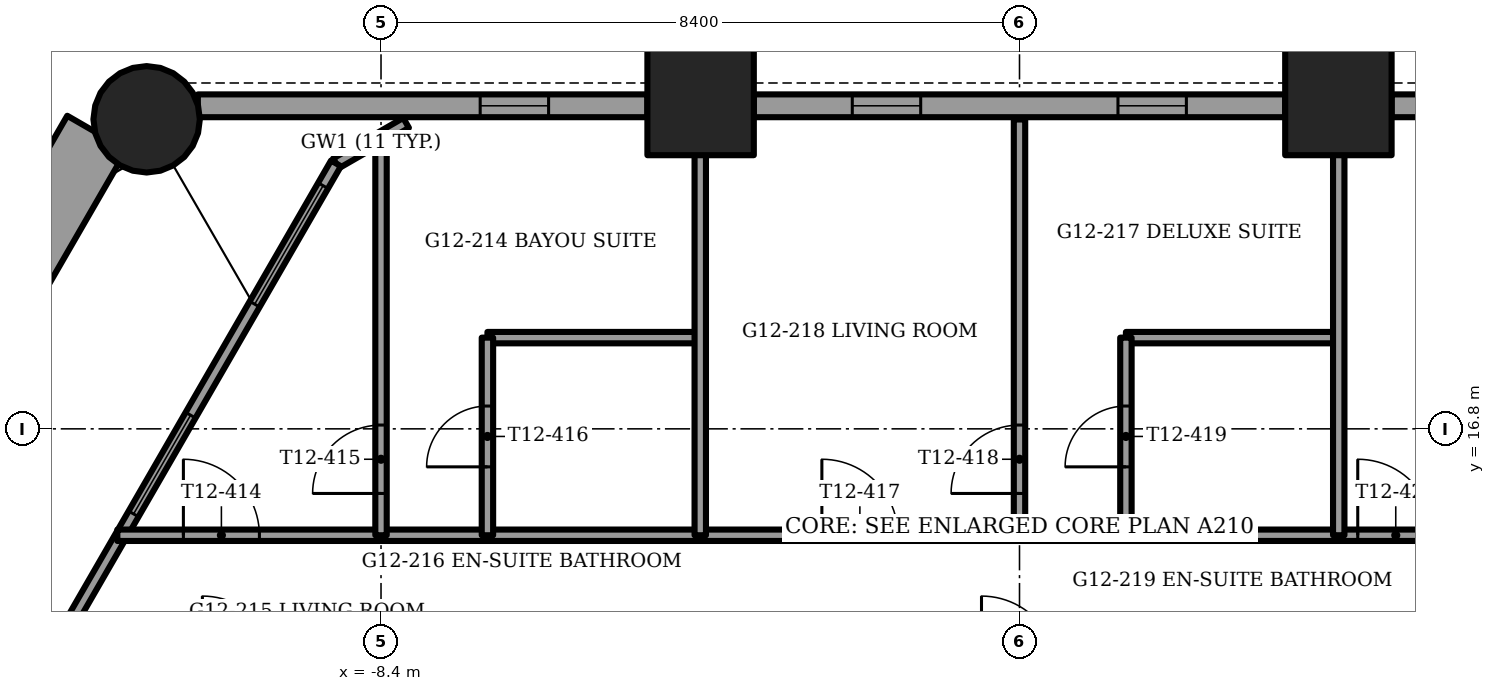
"""IFC4 building model, lengths in metres.
Left out: names, types, materials, properties, quantities, classifications, styles, units other than length and angle.
Written with IfcOpenShell. Run it as: python <this file> out.ifc"""

import sys

from ifc_helpers import new_model, si_unit, direction, frame, frame_2d, origin, origin_2d, place, context, subcontext, project, spatial, rectangle, circle, extrude, element, fill, save


model = new_model("IFC4")
c1 = context("Model", 3, precision=1e-05, world=origin(), true_north=direction((0.0, 1.0)))
c2 = subcontext(c1, "Body", "Model", "MODEL_VIEW")
j1 = project(units=[si_unit("LENGTHUNIT", "METRE"), si_unit("PLANEANGLEUNIT", "RADIAN")], contexts=[c1])
p1 = place(None, origin())
s1 = spatial("IfcSite", under=j1, at=p1, CompositionType="ELEMENT")
p2 = place(p1, origin())
s2 = spatial("IfcBuilding", under=s1, at=p2, CompositionType="ELEMENT")
p3 = place(p2, frame((0.0, 0.0, 50.5)))
s3 = spatial("IfcBuildingStorey", under=s2, at=p3, CompositionType="ELEMENT", Elevation=50.5)
p4 = place(p3, frame((-11.484, 20.872, -1.2), z_axis=(0.0, 0.0, 1.0), x_axis=(1.0, 0.0, 0.0)))
e1 = element("IfcColumn", 1, at=p4, inside=s3, PredefinedType="COLUMN", context=c2, shape_type="SweptSolid", body=[
    extrude(circle(Radius=0.7, at=origin_2d()), origin(), (0.0, 0.0, 1.0), 3.75),
])
for number, where, z_axis, x_axis in (
    (2, (4.195, 21.1, -1.2), (0.0, 0.0, 1.0), (1.0, 0.0, 0.0)),
    (3, (-4.195, 21.1, -1.2), (0.0, 0.0, 1.0), (1.0, 0.0, 0.0)),
):
    element("IfcColumn", number, at=place(p3, frame(where, z_axis=z_axis, x_axis=x_axis)), inside=s3, PredefinedType="COLUMN", context=c2, shape_type="SweptSolid", body=[
        extrude(rectangle(XDim=1.4, YDim=1.4, at=origin_2d()), origin(), (0.0, 0.0, 1.0), 3.75),
    ])
p5 = place(p3, frame((-12.138, 20.694, 0.0), z_axis=(0.0, 0.0, 1.0), x_axis=(-0.500009789943, -0.866019751484, 0.0)))
e4 = element("IfcWall", 4, at=p5, inside=s3, PredefinedType="PARAPET", context=c2, shape_type="SweptSolid", body=[
    extrude(rectangle(XDim=6.987, YDim=0.9, at=frame_2d((3.494, 0.0))), origin(), (0.0, 0.0, 1.0), 1.1),
])
p6 = place(p3, frame((10.81, 21.05, 0.0), z_axis=(0.0, 0.0, 1.0), x_axis=(-1.0, 0.0, 0.0)))
e5 = element("IfcWall", 5, at=p6, inside=s3, PredefinedType="SOLIDWALL", context=c2, shape_type="SweptSolid", body=[
    extrude(rectangle(XDim=5.914, YDim=0.3, at=frame_2d((2.957, 0.0))), origin(), (0.0, 0.0, 1.0), 2.55),
])
p7 = place(p6, frame((3.522, 0.0, 0.15)))
e6 = element("IfcOpeningElement", 6, at=p7, cuts=e5, PredefinedType="OPENING", context=c2, shape_type="SweptSolid", body=[
    extrude(rectangle(XDim=0.9, YDim=2.15, at=frame_2d((0.45, 1.075))), frame((0.0, 0.15, 0.0), z_axis=(0.0, -1.0, 0.0), x_axis=(1.0, 0.0, 0.0)), (0.0, 0.0, 1.0), 0.3),
])
p8 = place(p3, frame((3.495, 21.05, 0.0), z_axis=(0.0, 0.0, 1.0), x_axis=(-1.0, 0.0, 0.0)))
e7 = element("IfcWall", 7, at=p8, inside=s3, PredefinedType="SOLIDWALL", context=c2, shape_type="SweptSolid", body=[
    extrude(rectangle(XDim=6.991, YDim=0.3, at=frame_2d((3.495, 0.0))), origin(), (0.0, 0.0, 1.0), 2.55),
])
p9 = place(p8, frame((1.3, 0.0, 0.15)))
e8 = element("IfcOpeningElement", 8, at=p9, cuts=e7, PredefinedType="OPENING", context=c2, shape_type="SweptSolid", body=[
    extrude(rectangle(XDim=0.9, YDim=2.15, at=frame_2d((0.45, 1.075))), frame((0.0, 0.15, 0.0), z_axis=(0.0, -1.0, 0.0), x_axis=(1.0, 0.0, 0.0)), (0.0, 0.0, 1.0), 0.3),
])
p10 = place(p8, frame((4.795, 0.0, 0.15)))
e9 = element("IfcOpeningElement", 9, at=p10, cuts=e7, PredefinedType="OPENING", context=c2, shape_type="SweptSolid", body=[
    extrude(rectangle(XDim=0.9, YDim=2.15, at=frame_2d((0.45, 1.075))), frame((0.0, 0.15, 0.0), z_axis=(0.0, -1.0, 0.0), x_axis=(1.0, 0.0, 0.0)), (0.0, 0.0, 1.0), 0.3),
])
p11 = place(p3, frame((-4.896, 21.05, 0.0), z_axis=(0.0, 0.0, 1.0), x_axis=(-1.0, 0.0, 0.0)))
e10 = element("IfcWall", 10, at=p11, inside=s3, PredefinedType="SOLIDWALL", context=c2, shape_type="SweptSolid", body=[
    extrude(rectangle(XDim=5.914, YDim=0.3, at=frame_2d((2.957, 0.0))), origin(), (0.0, 0.0, 1.0), 2.55),
])
p12 = place(p11, frame((1.3, 0.0, 0.15)))
e11 = element("IfcOpeningElement", 11, at=p12, cuts=e10, PredefinedType="OPENING", context=c2, shape_type="SweptSolid", body=[
    extrude(rectangle(XDim=0.9, YDim=2.15, at=frame_2d((0.45, 1.075))), frame((0.0, 0.15, 0.0), z_axis=(0.0, -1.0, 0.0), x_axis=(1.0, 0.0, 0.0)), (0.0, 0.0, 1.0), 0.3),
])
p13 = place(p3, frame((-8.993, 20.292, 0.0), z_axis=(0.0, 0.0, 1.0), x_axis=(-0.49999960747, -0.866025630412, 0.0)))
e12 = element("IfcWall", 12, at=p13, inside=s3, PredefinedType="SOLIDWALL", context=c2, shape_type="SweptSolid", body=[
    extrude(rectangle(XDim=23.384, YDim=0.15, at=frame_2d((11.692, 0.0))), origin(), (0.0, 0.0, 1.0), 3.45),
])
p14 = place(p13, frame((3.825, 0.0, 0.15)))
e13 = element("IfcOpeningElement", 13, at=p14, cuts=e12, PredefinedType="OPENING", context=c2, shape_type="SweptSolid", body=[
    extrude(rectangle(XDim=1.5, YDim=2.85, at=frame_2d((0.75, 1.425))), frame((0.0, 0.075, 0.0), z_axis=(0.0, -1.0, 0.0), x_axis=(1.0, 0.0, 0.0)), (0.0, 0.0, 1.0), 0.15),
])
p15 = place(p13, frame((7.687, 0.0, 0.15)))
e14 = element("IfcOpeningElement", 14, at=p15, cuts=e12, PredefinedType="OPENING", context=c2, shape_type="SweptSolid", body=[
    extrude(rectangle(XDim=1.5, YDim=2.85, at=frame_2d((0.75, 1.425))), frame((0.0, 0.075, 0.0), z_axis=(0.0, -1.0, 0.0), x_axis=(1.0, 0.0, 0.0)), (0.0, 0.0, 1.0), 0.15),
])
p16 = place(p13, frame((11.278, 0.0, 0.15)))
e15 = element("IfcOpeningElement", 15, at=p16, cuts=e12, PredefinedType="OPENING", context=c2, shape_type="SweptSolid", body=[
    extrude(rectangle(XDim=1.8, YDim=2.85, at=frame_2d((0.9, 1.425))), frame((0.0, 0.075, 0.0), z_axis=(0.0, -1.0, 0.0), x_axis=(1.0, 0.0, 0.0)), (0.0, 0.0, 1.0), 0.15),
])
p17 = place(p13, frame((13.377, 0.0, 0.15)))
e16 = element("IfcOpeningElement", 16, at=p17, cuts=e12, PredefinedType="OPENING", context=c2, shape_type="SweptSolid", body=[
    extrude(rectangle(XDim=1.5, YDim=2.85, at=frame_2d((0.75, 1.425))), frame((0.0, 0.075, 0.0), z_axis=(0.0, -1.0, 0.0), x_axis=(1.0, 0.0, 0.0)), (0.0, 0.0, 1.0), 0.15),
])
p18 = place(p13, frame((15.478, 0.0, 0.15)))
e17 = element("IfcOpeningElement", 17, at=p18, cuts=e12, PredefinedType="OPENING", context=c2, shape_type="SweptSolid", body=[
    extrude(rectangle(XDim=1.8, YDim=2.85, at=frame_2d((0.9, 1.425))), frame((0.0, 0.075, 0.0), z_axis=(0.0, -1.0, 0.0), x_axis=(1.0, 0.0, 0.0)), (0.0, 0.0, 1.0), 0.15),
])
p19 = place(p13, frame((17.577, 0.0, 0.15)))
e18 = element("IfcOpeningElement", 18, at=p19, cuts=e12, PredefinedType="OPENING", context=c2, shape_type="SweptSolid", body=[
    extrude(rectangle(XDim=1.5, YDim=2.85, at=frame_2d((0.75, 1.425))), frame((0.0, 0.075, 0.0), z_axis=(0.0, -1.0, 0.0), x_axis=(1.0, 0.0, 0.0)), (0.0, 0.0, 1.0), 0.15),
])
p20 = place(p13, frame((0.339, 0.0, 0.15)))
e19 = element("IfcOpeningElement", 19, at=p20, cuts=e12, PredefinedType="OPENING", context=c2, shape_type="SweptSolid", body=[
    extrude(rectangle(XDim=1.8, YDim=2.73, at=frame_2d((0.9, 1.365))), frame((0.0, 0.075, 0.0), z_axis=(0.0, -1.0, 0.0), x_axis=(1.0, 0.0, 0.0)), (0.0, 0.0, 1.0), 0.15),
])
p21 = place(p13, frame((21.12, 0.0, 0.15)))
e20 = element("IfcOpeningElement", 20, at=p21, cuts=e12, PredefinedType="OPENING", context=c2, shape_type="SweptSolid", body=[
    extrude(rectangle(XDim=1.8, YDim=2.73, at=frame_2d((0.9, 1.365))), frame((0.0, 0.075, 0.0), z_axis=(0.0, -1.0, 0.0), x_axis=(1.0, 0.0, 0.0)), (0.0, 0.0, 1.0), 0.15),
])
p22 = place(p3, frame((-8.07, 20.825, 0.0), z_axis=(0.0, 0.0, 1.0), x_axis=(-0.866048165231, -0.499960573946, 0.0)))
e21 = element("IfcWall", 21, at=p22, inside=s3, PredefinedType="SOLIDWALL", context=c2, shape_type="SweptSolid", body=[
    extrude(rectangle(XDim=1.065, YDim=0.15, at=frame_2d((0.532, 0.0))), origin(), (0.0, 0.0, 1.0), 3.45),
])
p23 = place(p3, frame((-11.869, 15.4, 0.0), z_axis=(0.0, 0.0, 1.0), x_axis=(1.0, 0.0, 0.0)))
e22 = element("IfcWall", 22, at=p23, inside=s3, PredefinedType="PARTITIONING", context=c2, shape_type="SweptSolid", body=[
    extrude(rectangle(XDim=23.738, YDim=0.15, at=frame_2d((11.869, 0.0))), origin(), (0.0, 0.0, 1.0), 3.45),
])
p24 = place(p23, frame((0.869, 0.0, 0.0)))
e23 = element("IfcOpeningElement", 23, at=p24, cuts=e22, PredefinedType="OPENING", context=c2, shape_type="SweptSolid", body=[
    extrude(rectangle(XDim=1.0, YDim=2.1, at=frame_2d((0.5, 1.05))), frame((0.0, 0.075, 0.0), z_axis=(0.0, -1.0, 0.0), x_axis=(1.0, 0.0, 0.0)), (0.0, 0.0, 1.0), 0.15),
])
p25 = place(p23, frame((9.269, 0.0, 0.0)))
e24 = element("IfcOpeningElement", 24, at=p25, cuts=e22, PredefinedType="OPENING", context=c2, shape_type="SweptSolid", body=[
    extrude(rectangle(XDim=1.0, YDim=2.1, at=frame_2d((0.5, 1.05))), frame((0.0, 0.075, 0.0), z_axis=(0.0, -1.0, 0.0), x_axis=(1.0, 0.0, 0.0)), (0.0, 0.0, 1.0), 0.15),
])
p26 = place(p23, frame((16.319, 0.0, 0.0)))
e25 = element("IfcOpeningElement", 25, at=p26, cuts=e22, PredefinedType="OPENING", context=c2, shape_type="SweptSolid", body=[
    extrude(rectangle(XDim=1.0, YDim=2.1, at=frame_2d((0.5, 1.05))), frame((0.0, 0.075, 0.0), z_axis=(0.0, -1.0, 0.0), x_axis=(1.0, 0.0, 0.0)), (0.0, 0.0, 1.0), 0.15),
])
for number, where, z_axis, x_axis in (
    (26, (-7.0, 18.0, 0.0), (0.0, 0.0, 1.0), (1.0, 0.0, 0.0)),
    (27, (1.4, 18.0, 0.0), (0.0, 0.0, 1.0), (1.0, 0.0, 0.0)),
):
    element("IfcWall", number, at=place(p3, frame(where, z_axis=z_axis, x_axis=x_axis)), inside=s3, PredefinedType="PARTITIONING", context=c2, shape_type="SweptSolid", body=[
        extrude(rectangle(XDim=2.8, YDim=0.15, at=frame_2d((1.4, 0.0))), origin(), (0.0, 0.0, 1.0), 3.45),
    ])
p27 = place(p3, frame((4.2, 15.4, 0.0), z_axis=(0.0, 0.0, 1.0), x_axis=(0.0, 1.0, 0.0)))
e28 = element("IfcWall", 28, at=p27, inside=s3, PredefinedType="PARTITIONING", context=c2, shape_type="SweptSolid", body=[
    extrude(rectangle(XDim=5.47, YDim=0.15, at=frame_2d((2.735, 0.0))), origin(), (0.0, 0.0, 1.0), 3.45),
])
p28 = place(p3, frame((1.4, 15.4, 0.0), z_axis=(0.0, 0.0, 1.0), x_axis=(0.0, 1.0, 0.0)))
e29 = element("IfcWall", 29, at=p28, inside=s3, PredefinedType="PARTITIONING", context=c2, shape_type="SweptSolid", body=[
    extrude(rectangle(XDim=2.6, YDim=0.15, at=frame_2d((1.3, 0.0))), origin(), (0.0, 0.0, 1.0), 3.45),
])
p29 = place(p28, frame((0.9, 0.0, 0.0)))
e30 = element("IfcOpeningElement", 30, at=p29, cuts=e29, PredefinedType="OPENING", context=c2, shape_type="SweptSolid", body=[
    extrude(rectangle(XDim=0.8, YDim=2.1, at=frame_2d((0.4, 1.05))), frame((0.0, 0.075, 0.0), z_axis=(0.0, -1.0, 0.0), x_axis=(1.0, 0.0, 0.0)), (0.0, 0.0, 1.0), 0.15),
])
p30 = place(p3, frame((0.0, 15.4, 0.0), z_axis=(0.0, 0.0, 1.0), x_axis=(0.0, 1.0, 0.0)))
e31 = element("IfcWall", 31, at=p30, inside=s3, PredefinedType="PARTITIONING", context=c2, shape_type="SweptSolid", body=[
    extrude(rectangle(XDim=5.47, YDim=0.15, at=frame_2d((2.735, 0.0))), origin(), (0.0, 0.0, 1.0), 3.45),
])
p31 = place(p30, frame((0.55, 0.0, 0.0)))
e32 = element("IfcOpeningElement", 32, at=p31, cuts=e31, PredefinedType="OPENING", context=c2, shape_type="SweptSolid", body=[
    extrude(rectangle(XDim=0.9, YDim=2.1, at=frame_2d((0.45, 1.05))), frame((0.0, 0.075, 0.0), z_axis=(0.0, -1.0, 0.0), x_axis=(1.0, 0.0, 0.0)), (0.0, 0.0, 1.0), 0.15),
])
p32 = place(p3, frame((-4.2, 15.4, 0.0), z_axis=(0.0, 0.0, 1.0), x_axis=(0.0, 1.0, 0.0)))
e33 = element("IfcWall", 33, at=p32, inside=s3, PredefinedType="PARTITIONING", context=c2, shape_type="SweptSolid", body=[
    extrude(rectangle(XDim=5.47, YDim=0.15, at=frame_2d((2.735, 0.0))), origin(), (0.0, 0.0, 1.0), 3.45),
])
p33 = place(p3, frame((-7.0, 15.4, 0.0), z_axis=(0.0, 0.0, 1.0), x_axis=(0.0, 1.0, 0.0)))
e34 = element("IfcWall", 34, at=p33, inside=s3, PredefinedType="PARTITIONING", context=c2, shape_type="SweptSolid", body=[
    extrude(rectangle(XDim=2.6, YDim=0.15, at=frame_2d((1.3, 0.0))), origin(), (0.0, 0.0, 1.0), 3.45),
])
p34 = place(p33, frame((0.9, 0.0, 0.0)))
e35 = element("IfcOpeningElement", 35, at=p34, cuts=e34, PredefinedType="OPENING", context=c2, shape_type="SweptSolid", body=[
    extrude(rectangle(XDim=0.8, YDim=2.1, at=frame_2d((0.4, 1.05))), frame((0.0, 0.075, 0.0), z_axis=(0.0, -1.0, 0.0), x_axis=(1.0, 0.0, 0.0)), (0.0, 0.0, 1.0), 0.15),
])
p35 = place(p3, frame((-8.4, 15.4, 0.0), z_axis=(0.0, 0.0, 1.0), x_axis=(0.0, 1.0, 0.0)))
e36 = element("IfcWall", 36, at=p35, inside=s3, PredefinedType="PARTITIONING", context=c2, shape_type="SweptSolid", body=[
    extrude(rectangle(XDim=5.255, YDim=0.15, at=frame_2d((2.627, 0.0))), origin(), (0.0, 0.0, 1.0), 3.45),
])
p36 = place(p35, frame((0.55, 0.0, 0.0)))
e37 = element("IfcOpeningElement", 37, at=p36, cuts=e36, PredefinedType="OPENING", context=c2, shape_type="SweptSolid", body=[
    extrude(rectangle(XDim=0.9, YDim=2.1, at=frame_2d((0.45, 1.05))), frame((0.0, 0.075, 0.0), z_axis=(0.0, -1.0, 0.0), x_axis=(1.0, 0.0, 0.0)), (0.0, 0.0, 1.0), 0.15),
])
p37 = place(p9, origin())
e38 = element("IfcWindow", 38, at=p37, inside=s3, PartitioningType="SINGLE_PANEL", PredefinedType="WINDOW", context=c2, shape_type="SweptSolid", body=[
    extrude(rectangle(XDim=0.9, YDim=2.15, at=frame_2d((0.45, 1.075))), frame((0.0, 0.03, 0.0), z_axis=(0.0, -1.0, 0.0), x_axis=(1.0, 0.0, 0.0)), (0.0, 0.0, 1.0), 0.06),
])
fill(e8, e38)
p38 = place(p10, origin())
e39 = element("IfcWindow", 39, at=p38, inside=s3, PartitioningType="SINGLE_PANEL", PredefinedType="WINDOW", context=c2, shape_type="SweptSolid", body=[
    extrude(rectangle(XDim=0.9, YDim=2.15, at=frame_2d((0.45, 1.075))), frame((0.0, 0.03, 0.0), z_axis=(0.0, -1.0, 0.0), x_axis=(1.0, 0.0, 0.0)), (0.0, 0.0, 1.0), 0.06),
])
fill(e9, e39)
p39 = place(p12, origin())
e40 = element("IfcWindow", 40, at=p39, inside=s3, PartitioningType="SINGLE_PANEL", PredefinedType="WINDOW", context=c2, shape_type="SweptSolid", body=[
    extrude(rectangle(XDim=0.9, YDim=2.15, at=frame_2d((0.45, 1.075))), frame((0.0, 0.03, 0.0), z_axis=(0.0, -1.0, 0.0), x_axis=(1.0, 0.0, 0.0)), (0.0, 0.0, 1.0), 0.06),
])
fill(e11, e40)
p40 = place(p14, origin())
e41 = element("IfcWindow", 41, at=p40, inside=s3, PartitioningType="SINGLE_PANEL", PredefinedType="WINDOW", context=c2, shape_type="SweptSolid", body=[
    extrude(rectangle(XDim=1.5, YDim=2.85, at=frame_2d((0.75, 1.425))), frame((0.0, 0.03, 0.0), z_axis=(0.0, -1.0, 0.0), x_axis=(1.0, 0.0, 0.0)), (0.0, 0.0, 1.0), 0.06),
])
fill(e13, e41)
p41 = place(p20, origin())
e42 = element("IfcWindow", 42, at=p41, inside=s3, PartitioningType="SINGLE_PANEL", PredefinedType="WINDOW", context=c2, shape_type="SweptSolid", body=[
    extrude(rectangle(XDim=1.8, YDim=2.73, at=frame_2d((0.9, 1.365))), frame((0.0, 0.03, 0.0), z_axis=(0.0, -1.0, 0.0), x_axis=(1.0, 0.0, 0.0)), (0.0, 0.0, 1.0), 0.06),
])
fill(e19, e42)
p42 = place(p24, origin())
e43 = element("IfcDoor", 43, at=p42, inside=s3, OperationType="SINGLE_SWING_LEFT", PredefinedType="DOOR", context=c2, shape_type="SweptSolid", body=[
    extrude(rectangle(XDim=1.0, YDim=2.1, at=frame_2d((0.5, 1.05))), frame((0.0, 0.025, 0.0), z_axis=(0.0, -1.0, 0.0), x_axis=(1.0, 0.0, 0.0)), (0.0, 0.0, 1.0), 0.05),
])
fill(e23, e43)
p43 = place(p36, origin())
e44 = element("IfcDoor", 44, at=p43, inside=s3, OperationType="SINGLE_SWING_LEFT", PredefinedType="DOOR", context=c2, shape_type="SweptSolid", body=[
    extrude(rectangle(XDim=0.9, YDim=2.1, at=frame_2d((0.45, 1.05))), frame((0.0, 0.025, 0.0), z_axis=(0.0, -1.0, 0.0), x_axis=(1.0, 0.0, 0.0)), (0.0, 0.0, 1.0), 0.05),
])
fill(e37, e44)
p44 = place(p34, origin())
e45 = element("IfcDoor", 45, at=p44, inside=s3, OperationType="SINGLE_SWING_LEFT", PredefinedType="DOOR", context=c2, shape_type="SweptSolid", body=[
    extrude(rectangle(XDim=0.8, YDim=2.1, at=frame_2d((0.4, 1.05))), frame((0.0, 0.025, 0.0), z_axis=(0.0, -1.0, 0.0), x_axis=(1.0, 0.0, 0.0)), (0.0, 0.0, 1.0), 0.05),
])
fill(e35, e45)
p45 = place(p25, origin())
e46 = element("IfcDoor", 46, at=p45, inside=s3, OperationType="SINGLE_SWING_LEFT", PredefinedType="DOOR", context=c2, shape_type="SweptSolid", body=[
    extrude(rectangle(XDim=1.0, YDim=2.1, at=frame_2d((0.5, 1.05))), frame((0.0, 0.025, 0.0), z_axis=(0.0, -1.0, 0.0), x_axis=(1.0, 0.0, 0.0)), (0.0, 0.0, 1.0), 0.05),
])
fill(e24, e46)
p46 = place(p31, origin())
e47 = element("IfcDoor", 47, at=p46, inside=s3, OperationType="SINGLE_SWING_LEFT", PredefinedType="DOOR", context=c2, shape_type="SweptSolid", body=[
    extrude(rectangle(XDim=0.9, YDim=2.1, at=frame_2d((0.45, 1.05))), frame((0.0, 0.025, 0.0), z_axis=(0.0, -1.0, 0.0), x_axis=(1.0, 0.0, 0.0)), (0.0, 0.0, 1.0), 0.05),
])
fill(e32, e47)
p47 = place(p29, origin())
e48 = element("IfcDoor", 48, at=p47, inside=s3, OperationType="SINGLE_SWING_LEFT", PredefinedType="DOOR", context=c2, shape_type="SweptSolid", body=[
    extrude(rectangle(XDim=0.8, YDim=2.1, at=frame_2d((0.4, 1.05))), frame((0.0, 0.025, 0.0), z_axis=(0.0, -1.0, 0.0), x_axis=(1.0, 0.0, 0.0)), (0.0, 0.0, 1.0), 0.05),
])
fill(e30, e48)
p48 = place(p26, origin())
e49 = element("IfcDoor", 49, at=p48, inside=s3, OperationType="SINGLE_SWING_LEFT", PredefinedType="DOOR", context=c2, shape_type="SweptSolid", body=[
    extrude(rectangle(XDim=1.0, YDim=2.1, at=frame_2d((0.5, 1.05))), frame((0.0, 0.025, 0.0), z_axis=(0.0, -1.0, 0.0), x_axis=(1.0, 0.0, 0.0)), (0.0, 0.0, 1.0), 0.05),
])
fill(e25, e49)
save(model, sys.argv[1])
